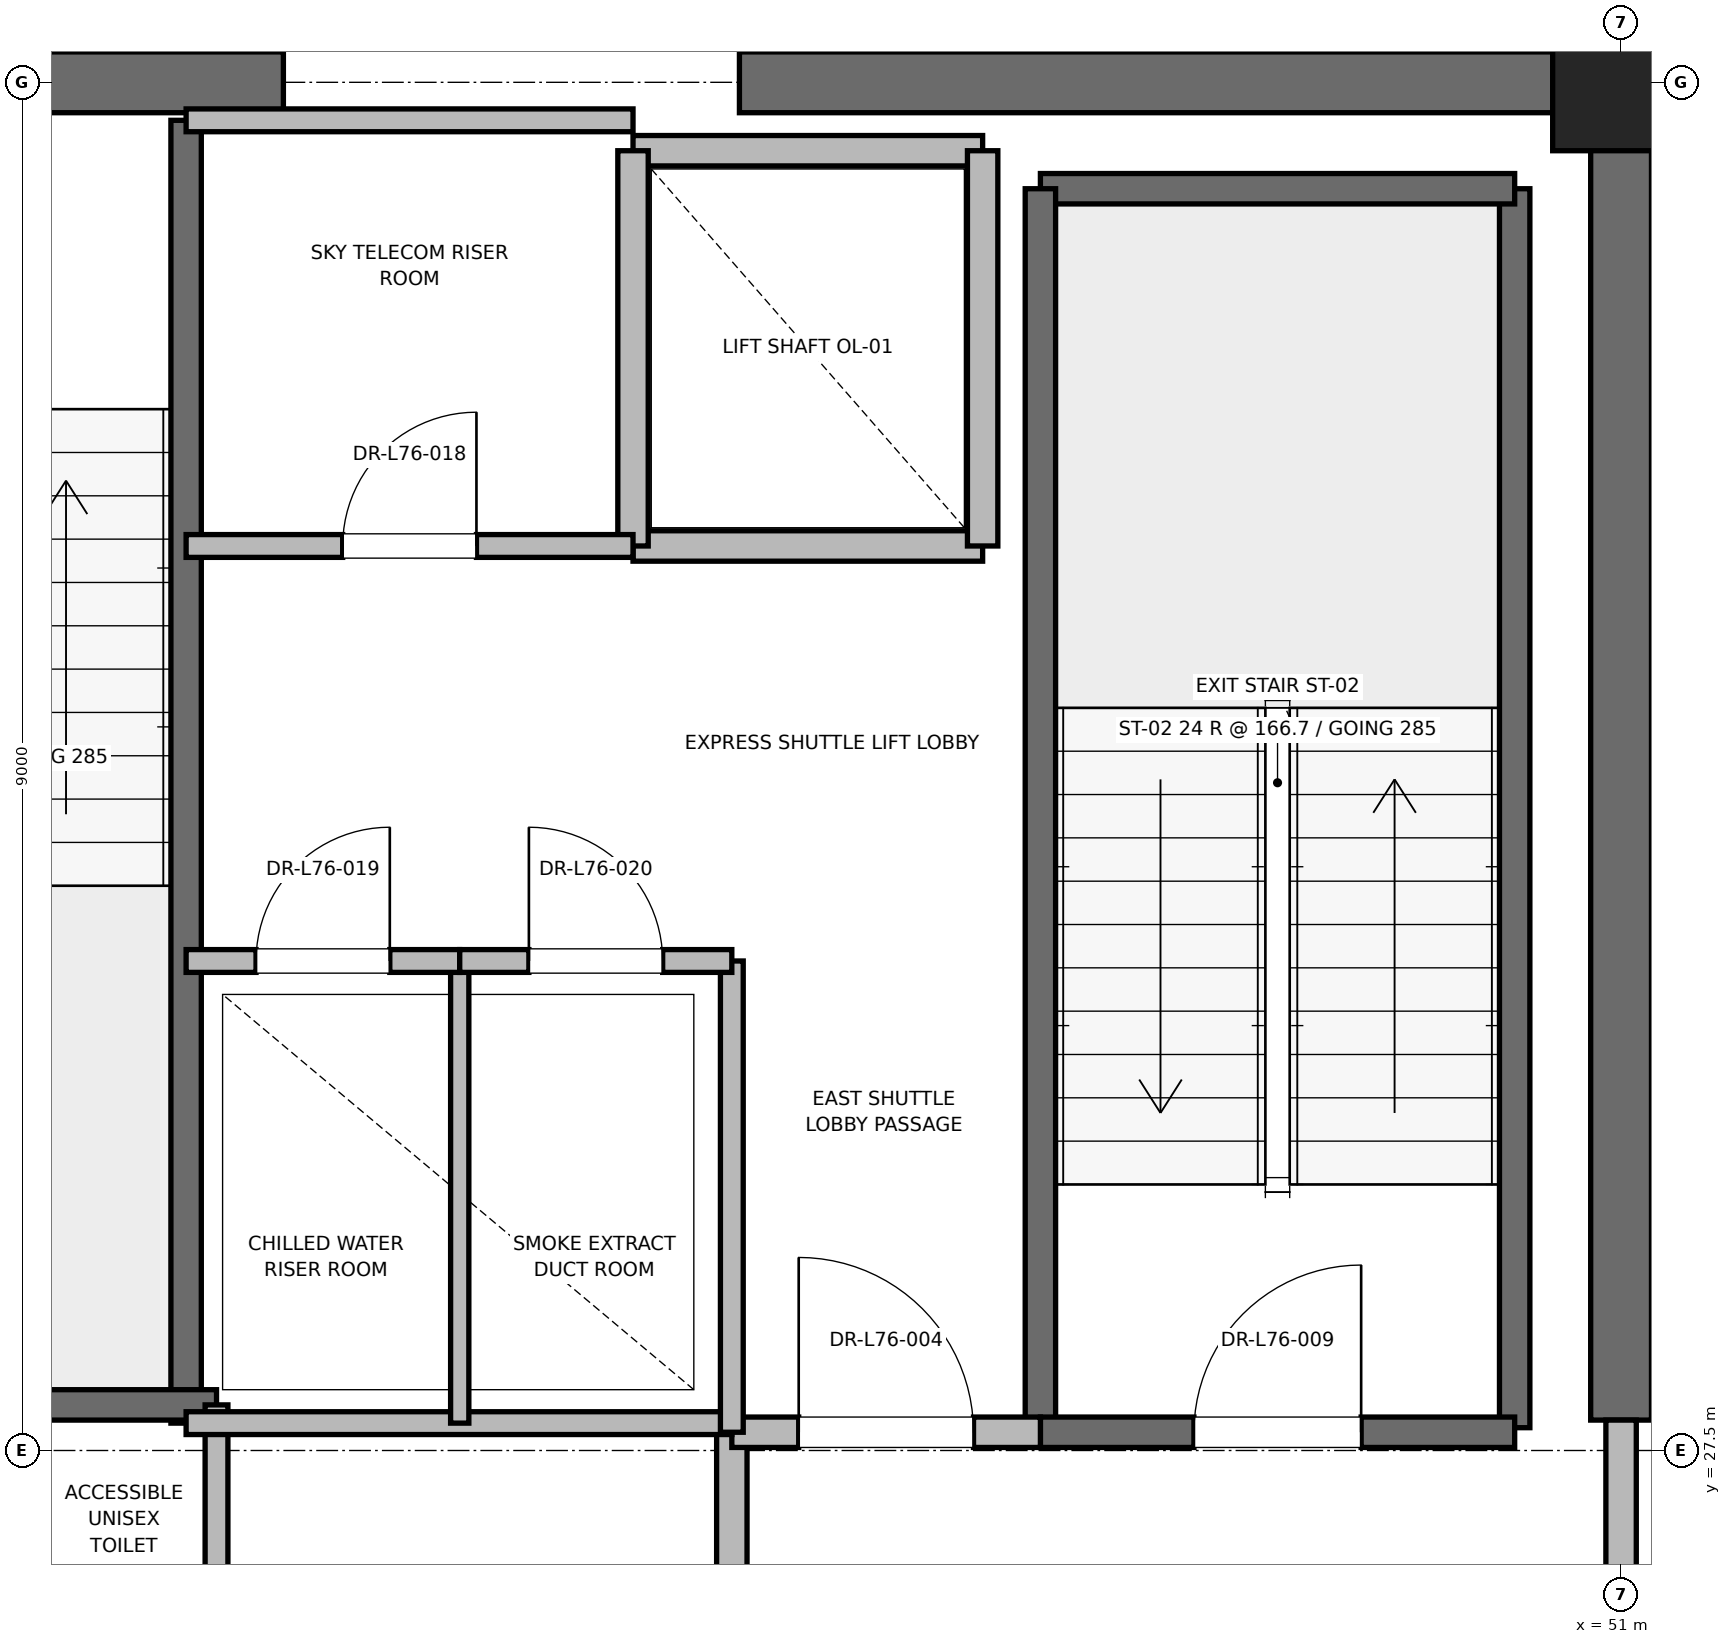
"""IFC4 building model, lengths in metres.
Left out: names, types, materials, properties, quantities, classifications, styles, units other than length and angle.
Written with IfcOpenShell. Run it as: python <this file> out.ifc"""

import sys

from ifc_helpers import new_model, si_unit, direction, frame, frame_2d, origin, origin_2d, place, context, subcontext, project, spatial, rectangle, extrude, element, fill, save


model = new_model("IFC4")
c1 = context("Model", 3, precision=1e-05, world=origin(), true_north=direction((0.0, 1.0)))
c2 = subcontext(c1, "Body", "Model", "MODEL_VIEW")
j1 = project(units=[si_unit("LENGTHUNIT", "METRE"), si_unit("PLANEANGLEUNIT", "RADIAN")], contexts=[c1])
p1 = place(None, origin())
s1 = spatial("IfcSite", under=j1, at=p1, CompositionType="ELEMENT")
p2 = place(p1, origin())
s2 = spatial("IfcBuilding", under=s1, at=p2, CompositionType="ELEMENT")
p3 = place(p2, frame((0.0, 0.0, 326.8)))
s3 = spatial("IfcBuildingStorey", under=s2, at=p3, CompositionType="ELEMENT", Elevation=326.8)
p4 = place(p3, frame((51.0, 36.5, 0.0), z_axis=(0.0, 0.0, 1.0), x_axis=(1.0, 0.0, 0.0)))
e1 = element("IfcColumn", 1, at=p4, inside=s3, PredefinedType="PILASTER", context=c2, shape_type="SweptSolid", body=[
    extrude(rectangle(XDim=0.9, YDim=0.9, at=origin_2d()), origin(), (0.0, 0.0, 1.0), 4.0),
])
p5 = place(p3, frame((37.8, 36.5, 0.0), z_axis=(0.0, 0.0, 1.0), x_axis=(1.0, 0.0, 0.0)))
e2 = element("IfcWall", 2, at=p5, inside=s3, PredefinedType="SHEAR", context=c2, shape_type="SweptSolid", body=[
    extrude(rectangle(XDim=4.4, YDim=0.4, at=frame_2d((2.2, 0.0))), origin(), (0.0, 0.0, 1.0), 3.785),
])
p6 = place(p5, frame((1.65, 0.0, 0.0)))
e3 = element("IfcOpeningElement", 3, at=p6, cuts=e2, PredefinedType="OPENING", context=c2, shape_type="SweptSolid", body=[
    extrude(rectangle(XDim=1.1, YDim=2.15, at=frame_2d((0.55, 1.075))), frame((0.0, 0.2, 0.0), z_axis=(0.0, -1.0, 0.0), x_axis=(1.0, 0.0, 0.0)), (0.0, 0.0, 1.0), 0.4),
])
p7 = place(p3, frame((45.2, 36.5, 0.0), z_axis=(0.0, 0.0, 1.0), x_axis=(1.0, 0.0, 0.0)))
e4 = element("IfcWall", 4, at=p7, inside=s3, PredefinedType="SHEAR", context=c2, shape_type="SweptSolid", body=[
    extrude(rectangle(XDim=5.8, YDim=0.4, at=frame_2d((2.9, 0.0))), origin(), (0.0, 0.0, 1.0), 3.785),
])
p8 = place(p3, frame((51.0, 27.7, 0.0), z_axis=(0.0, 0.0, 1.0), x_axis=(0.0, 1.0, 0.0)))
e5 = element("IfcWall", 5, at=p8, inside=s3, PredefinedType="SHEAR", context=c2, shape_type="SweptSolid", body=[
    extrude(rectangle(XDim=8.8, YDim=0.4, at=frame_2d((4.4, 0.0))), origin(), (0.0, 0.0, 1.0), 3.785),
])
p9 = place(p3, frame((50.3, 27.65, 0.0), z_axis=(0.0, 0.0, 1.0), x_axis=(0.0, 1.0, 0.0)))
e6 = element("IfcWall", 6, at=p9, inside=s3, PredefinedType="SOLIDWALL", context=c2, shape_type="SweptSolid", body=[
    extrude(rectangle(XDim=8.15, YDim=0.2, at=frame_2d((4.075, 0.0))), origin(), (0.0, 0.0, 1.0), 3.785),
])
p10 = place(p3, frame((47.18, 35.8, 0.0), z_axis=(0.0, 0.0, 1.0), x_axis=(1.0, 0.0, 0.0)))
e7 = element("IfcWall", 7, at=p10, inside=s3, PredefinedType="SOLIDWALL", context=c2, shape_type="SweptSolid", body=[
    extrude(rectangle(XDim=3.12, YDim=0.2, at=frame_2d((1.56, 0.0))), origin(), (0.0, 0.0, 1.0), 3.785),
])
p11 = place(p3, frame((47.18, 27.62, 0.0), z_axis=(0.0, 0.0, 1.0), x_axis=(0.0, 1.0, 0.0)))
e8 = element("IfcWall", 8, at=p11, inside=s3, PredefinedType="SOLIDWALL", context=c2, shape_type="SweptSolid", body=[
    extrude(rectangle(XDim=8.18, YDim=0.2, at=frame_2d((4.09, 0.0))), origin(), (0.0, 0.0, 1.0), 3.785),
])
p12 = place(p3, frame((47.18, 27.62, 0.0), z_axis=(0.0, 0.0, 1.0), x_axis=(1.0, 0.0, 0.0)))
e9 = element("IfcWall", 9, at=p12, inside=s3, PredefinedType="SOLIDWALL", context=c2, shape_type="SweptSolid", body=[
    extrude(rectangle(XDim=3.12, YDim=0.2, at=frame_2d((1.56, 0.0))), origin(), (0.0, 0.0, 1.0), 3.785),
])
p13 = place(p12, frame((1.01, 0.0, 0.0)))
e10 = element("IfcOpeningElement", 10, at=p13, cuts=e9, PredefinedType="OPENING", context=c2, shape_type="SweptSolid", body=[
    extrude(rectangle(XDim=1.1, YDim=2.15, at=frame_2d((0.55, 1.075))), frame((0.0, 0.1, 0.0), z_axis=(0.0, -1.0, 0.0), x_axis=(1.0, 0.0, 0.0)), (0.0, 0.0, 1.0), 0.2),
])
p14 = place(p3, frame((41.56, 27.68, 0.0), z_axis=(0.0, 0.0, 1.0), x_axis=(0.0, 1.0, 0.0)))
e11 = element("IfcWall", 11, at=p14, inside=s3, PredefinedType="SOLIDWALL", context=c2, shape_type="SweptSolid", body=[
    extrude(rectangle(XDim=8.57, YDim=0.2, at=frame_2d((4.285, 0.0))), origin(), (0.0, 0.0, 1.0), 3.785),
])
p15 = place(p3, frame((38.44, 27.8, 0.0), z_axis=(0.0, 0.0, 1.0), x_axis=(1.0, 0.0, 0.0)))
e12 = element("IfcWall", 12, at=p15, inside=s3, PredefinedType="SOLIDWALL", context=c2, shape_type="SweptSolid", body=[
    extrude(rectangle(XDim=3.32, YDim=0.2, at=frame_2d((1.66, 0.0))), origin(), (0.0, 0.0, 1.0), 3.785),
])
p16 = place(p3, frame((45.15, 24.25, 0.0), z_axis=(0.0, 0.0, 1.0), x_axis=(0.0, 1.0, 0.0)))
e13 = element("IfcWall", 13, at=p16, inside=s3, PredefinedType="PARTITIONING", context=c2, shape_type="SweptSolid", body=[
    extrude(rectangle(XDim=3.37, YDim=0.2, at=frame_2d((1.685, 0.0))), origin(), (0.0, 0.0, 1.0), 3.785),
])
p17 = place(p3, frame((45.15, 27.62, 0.0), z_axis=(0.0, 0.0, 1.0), x_axis=(1.0, 0.0, 0.0)))
e14 = element("IfcWall", 14, at=p17, inside=s3, PredefinedType="PARTITIONING", context=c2, shape_type="SweptSolid", body=[
    extrude(rectangle(XDim=2.03, YDim=0.2, at=frame_2d((1.015, 0.0))), origin(), (0.0, 0.0, 1.0), 3.785),
])
p18 = place(p17, frame((0.44, 0.0, 0.0)))
e15 = element("IfcOpeningElement", 15, at=p18, cuts=e14, PredefinedType="OPENING", context=c2, shape_type="SweptSolid", body=[
    extrude(rectangle(XDim=1.15, YDim=2.2, at=frame_2d((0.575, 1.1))), frame((0.0, 0.1, 0.0), z_axis=(0.0, -1.0, 0.0), x_axis=(1.0, 0.0, 0.0)), (0.0, 0.0, 1.0), 0.2),
])
p19 = place(p3, frame((51.0, 24.3, 0.0), z_axis=(0.0, 0.0, 1.0), x_axis=(0.0, 1.0, 0.0)))
e16 = element("IfcWall", 16, at=p19, inside=s3, PredefinedType="PARTITIONING", context=c2, shape_type="SweptSolid", body=[
    extrude(rectangle(XDim=3.4, YDim=0.2, at=frame_2d((1.7, 0.0))), origin(), (0.0, 0.0, 1.0), 2.865),
])
p20 = place(p19, frame((1.125, 0.0, 0.0)))
e17 = element("IfcOpeningElement", 17, at=p20, cuts=e16, PredefinedType="OPENING", context=c2, shape_type="SweptSolid", body=[
    extrude(rectangle(XDim=1.15, YDim=2.2, at=frame_2d((0.575, 1.1))), frame((0.0, 0.1, 0.0), z_axis=(0.0, -1.0, 0.0), x_axis=(1.0, 0.0, 0.0)), (0.0, 0.0, 1.0), 0.2),
])
p21 = place(p3, frame((44.5, 33.45, 0.0), z_axis=(0.0, 0.0, 1.0), x_axis=(1.0, 0.0, 0.0)))
e18 = element("IfcWall", 18, at=p21, inside=s3, PredefinedType="SOLIDWALL", context=c2, shape_type="SweptSolid", body=[
    extrude(rectangle(XDim=2.3, YDim=0.2, at=frame_2d((1.15, 0.0))), origin(), (0.0, 0.0, 1.0), 3.785),
])
p22 = place(p3, frame((46.8, 36.05, 0.0), z_axis=(0.0, 0.0, 1.0), x_axis=(-1.0, 0.0, 0.0)))
e19 = element("IfcWall", 19, at=p22, inside=s3, PredefinedType="SOLIDWALL", context=c2, shape_type="SweptSolid", body=[
    extrude(rectangle(XDim=2.3, YDim=0.2, at=frame_2d((1.15, 0.0))), origin(), (0.0, 0.0, 1.0), 2.865),
])
p23 = place(p3, frame((44.5, 36.05, 0.0), z_axis=(0.0, 0.0, 1.0), x_axis=(0.0, -1.0, 0.0)))
e20 = element("IfcWall", 20, at=p23, inside=s3, PredefinedType="SOLIDWALL", context=c2, shape_type="SweptSolid", body=[
    extrude(rectangle(XDim=2.6, YDim=0.2, at=frame_2d((1.3, 0.0))), origin(), (0.0, 0.0, 1.0), 2.865),
])
p24 = place(p3, frame((46.8, 33.45, 0.0), z_axis=(0.0, 0.0, 1.0), x_axis=(0.0, 1.0, 0.0)))
e21 = element("IfcWall", 21, at=p24, inside=s3, PredefinedType="SOLIDWALL", context=c2, shape_type="SweptSolid", body=[
    extrude(rectangle(XDim=2.6, YDim=0.2, at=frame_2d((1.3, 0.0))), origin(), (0.0, 0.0, 1.0), 3.785),
])
p25 = place(p3, frame((41.76, 23.8, 0.0), z_axis=(0.0, 0.0, 1.0), x_axis=(0.0, 1.0, 0.0)))
e22 = element("IfcWall", 22, at=p25, inside=s3, PredefinedType="PARTITIONING", context=c2, shape_type="SweptSolid", body=[
    extrude(rectangle(XDim=4.0, YDim=0.15, at=frame_2d((2.0, 0.0))), origin(), (0.0, 0.0, 1.0), 2.85),
])
p26 = place(p3, frame((41.56, 27.68, 0.0), z_axis=(0.0, 0.0, 1.0), x_axis=(1.0, 0.0, 0.0)))
e23 = element("IfcWall", 23, at=p26, inside=s3, PredefinedType="PARTITIONING", context=c2, shape_type="SweptSolid", body=[
    extrude(rectangle(XDim=3.59, YDim=0.15, at=frame_2d((1.795, 0.0))), origin(), (0.0, 0.0, 1.0), 2.85),
])
p27 = place(p3, frame((45.15, 27.62, 0.0), z_axis=(0.0, 0.0, 1.0), x_axis=(0.0, 1.0, 0.0)))
e24 = element("IfcWall", 24, at=p27, inside=s3, PredefinedType="PARTITIONING", context=c2, shape_type="SweptSolid", body=[
    extrude(rectangle(XDim=3.1, YDim=0.15, at=frame_2d((1.55, 0.0))), origin(), (0.0, 0.0, 1.0), 2.85),
])
p28 = place(p3, frame((43.36, 27.68, 0.0), z_axis=(0.0, 0.0, 1.0), x_axis=(0.0, 1.0, 0.0)))
e25 = element("IfcWall", 25, at=p28, inside=s3, PredefinedType="PARTITIONING", context=c2, shape_type="SweptSolid", body=[
    extrude(rectangle(XDim=3.04, YDim=0.12, at=frame_2d((1.52, 0.0))), origin(), (0.0, 0.0, 1.0), 2.85),
])
p29 = place(p3, frame((41.56, 30.72, 0.0), z_axis=(0.0, 0.0, 1.0), x_axis=(1.0, 0.0, 0.0)))
e26 = element("IfcWall", 26, at=p29, inside=s3, PredefinedType="PARTITIONING", context=c2, shape_type="SweptSolid", body=[
    extrude(rectangle(XDim=1.8, YDim=0.15, at=frame_2d((0.9, 0.0))), origin(), (0.0, 0.0, 1.0), 2.85),
])
p30 = place(p29, frame((0.46, 0.0, 0.0)))
e27 = element("IfcOpeningElement", 27, at=p30, cuts=e26, PredefinedType="OPENING", context=c2, shape_type="SweptSolid", body=[
    extrude(rectangle(XDim=0.88, YDim=2.1, at=frame_2d((0.44, 1.05))), frame((0.0, 0.075, 0.0), z_axis=(0.0, -1.0, 0.0), x_axis=(1.0, 0.0, 0.0)), (0.0, 0.0, 1.0), 0.15),
])
p31 = place(p3, frame((43.36, 30.72, 0.0), z_axis=(0.0, 0.0, 1.0), x_axis=(1.0, 0.0, 0.0)))
e28 = element("IfcWall", 28, at=p31, inside=s3, PredefinedType="PARTITIONING", context=c2, shape_type="SweptSolid", body=[
    extrude(rectangle(XDim=1.79, YDim=0.15, at=frame_2d((0.895, 0.0))), origin(), (0.0, 0.0, 1.0), 2.85),
])
p32 = place(p31, frame((0.455, 0.0, 0.0)))
e29 = element("IfcOpeningElement", 29, at=p32, cuts=e28, PredefinedType="OPENING", context=c2, shape_type="SweptSolid", body=[
    extrude(rectangle(XDim=0.88, YDim=2.1, at=frame_2d((0.44, 1.05))), frame((0.0, 0.075, 0.0), z_axis=(0.0, -1.0, 0.0), x_axis=(1.0, 0.0, 0.0)), (0.0, 0.0, 1.0), 0.15),
])
p33 = place(p3, frame((41.56, 36.25, 0.0), z_axis=(0.0, 0.0, 1.0), x_axis=(1.0, 0.0, 0.0)))
e30 = element("IfcWall", 30, at=p33, inside=s3, PredefinedType="PARTITIONING", context=c2, shape_type="SweptSolid", body=[
    extrude(rectangle(XDim=2.94, YDim=0.15, at=frame_2d((1.47, 0.0))), origin(), (0.0, 0.0, 1.0), 2.85),
])
p34 = place(p3, frame((41.56, 33.45, 0.0), z_axis=(0.0, 0.0, 1.0), x_axis=(1.0, 0.0, 0.0)))
e31 = element("IfcWall", 31, at=p34, inside=s3, PredefinedType="PARTITIONING", context=c2, shape_type="SweptSolid", body=[
    extrude(rectangle(XDim=2.94, YDim=0.15, at=frame_2d((1.47, 0.0))), origin(), (0.0, 0.0, 1.0), 2.85),
])
p35 = place(p34, frame((1.03, 0.0, 0.0)))
e32 = element("IfcOpeningElement", 32, at=p35, cuts=e31, PredefinedType="OPENING", context=c2, shape_type="SweptSolid", body=[
    extrude(rectangle(XDim=0.88, YDim=2.1, at=frame_2d((0.44, 1.05))), frame((0.0, 0.075, 0.0), z_axis=(0.0, -1.0, 0.0), x_axis=(1.0, 0.0, 0.0)), (0.0, 0.0, 1.0), 0.15),
])
p36 = place(p13, origin())
e33 = element("IfcDoor", 33, at=p36, inside=s3, OperationType="SINGLE_SWING_RIGHT", PredefinedType="DOOR", context=c2, shape_type="SweptSolid", body=[
    extrude(rectangle(XDim=1.1, YDim=2.15, at=frame_2d((0.55, 1.075))), frame((0.0, 0.025, 0.0), z_axis=(0.0, -1.0, 0.0), x_axis=(1.0, 0.0, 0.0)), (0.0, 0.0, 1.0), 0.05),
])
fill(e10, e33)
p37 = place(p18, origin())
e34 = element("IfcDoor", 34, at=p37, inside=s3, OperationType="SINGLE_SWING_LEFT", PredefinedType="DOOR", context=c2, shape_type="SweptSolid", body=[
    extrude(rectangle(XDim=1.15, YDim=2.2, at=frame_2d((0.575, 1.1))), frame((0.0, 0.025, 0.0), z_axis=(0.0, -1.0, 0.0), x_axis=(1.0, 0.0, 0.0)), (0.0, 0.0, 1.0), 0.05),
])
fill(e15, e34)
p38 = place(p30, origin())
e35 = element("IfcDoor", 35, at=p38, inside=s3, OperationType="SINGLE_SWING_RIGHT", PredefinedType="DOOR", context=c2, shape_type="SweptSolid", body=[
    extrude(rectangle(XDim=0.88, YDim=2.1, at=frame_2d((0.44, 1.05))), frame((0.0, 0.025, 0.0), z_axis=(0.0, -1.0, 0.0), x_axis=(1.0, 0.0, 0.0)), (0.0, 0.0, 1.0), 0.05),
])
fill(e27, e35)
p39 = place(p32, origin())
e36 = element("IfcDoor", 36, at=p39, inside=s3, OperationType="SINGLE_SWING_LEFT", PredefinedType="DOOR", context=c2, shape_type="SweptSolid", body=[
    extrude(rectangle(XDim=0.88, YDim=2.1, at=frame_2d((0.44, 1.05))), frame((0.0, 0.025, 0.0), z_axis=(0.0, -1.0, 0.0), x_axis=(1.0, 0.0, 0.0)), (0.0, 0.0, 1.0), 0.05),
])
fill(e29, e36)
p40 = place(p35, origin())
e37 = element("IfcDoor", 37, at=p40, inside=s3, OperationType="SINGLE_SWING_RIGHT", PredefinedType="DOOR", context=c2, shape_type="SweptSolid", body=[
    extrude(rectangle(XDim=0.88, YDim=2.1, at=frame_2d((0.44, 1.05))), frame((0.0, 0.025, 0.0), z_axis=(0.0, -1.0, 0.0), x_axis=(1.0, 0.0, 0.0)), (0.0, 0.0, 1.0), 0.05),
])
fill(e32, e37)
save(model, sys.argv[1])
